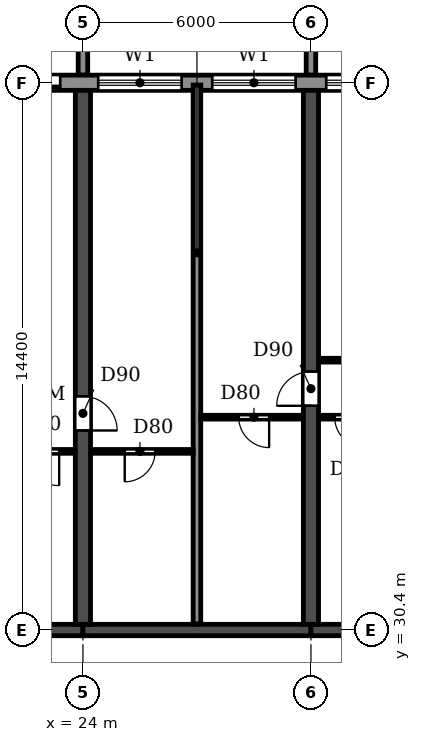
"""IFC4 building model, lengths in metres.
Left out: names, types, materials, properties, quantities, classifications, styles, units other than length and angle.
Written with IfcOpenShell. Run it as: python <this file> out.ifc"""

import sys

from ifc_helpers import new_model, si_unit, direction, frame, frame_2d, origin, place, context, subcontext, project, spatial, polyline, rectangle, outline, extrude, source, transform, mapped, element, fill, save


model = new_model("IFC4")
c1 = context("Model", 3, precision=1e-05, world=origin(), true_north=direction((0.0, 1.0)))
c2 = subcontext(c1, "Body", "Model", "MODEL_VIEW")
j1 = project(units=[si_unit("LENGTHUNIT", "METRE"), si_unit("PLANEANGLEUNIT", "RADIAN")], contexts=[c1])
p1 = place(None, origin())
s1 = spatial("IfcSite", under=j1, at=p1, CompositionType="ELEMENT")
p2 = place(p1, origin())
s2 = spatial("IfcBuilding", under=s1, at=p2, CompositionType="ELEMENT")
p3 = place(p2, frame((0.0, 0.0, 43.2)))
s3 = spatial("IfcBuildingStorey", under=s2, at=p3, CompositionType="ELEMENT", Elevation=43.2)
p4 = place(p3, frame((24.0, 30.55, 0.0), z_axis=(0.0, 0.0, 1.0), x_axis=(0.0, 1.0, 0.0)))
e1 = element("IfcWall", 1, at=p4, inside=s3, PredefinedType="SHEAR", context=c2, shape_type="SweptSolid", body=[
    extrude(rectangle(XDim=14.05, YDim=0.4, at=frame_2d((7.025, 0.0))), origin(), (0.0, 0.0, 1.0), 3.05),
])
p5 = place(p4, frame((5.1, 0.0, 0.0)))
e2 = element("IfcOpeningElement", 2, at=p5, cuts=e1, PredefinedType="OPENING", context=c2, shape_type="SweptSolid", body=[
    extrude(rectangle(XDim=0.9, YDim=2.1, at=frame_2d((0.45, 1.05))), frame((0.0, 0.21, 0.0), z_axis=(0.0, -1.0, 0.0), x_axis=(1.0, 0.0, 0.0)), (0.0, 0.0, 1.0), 0.42),
])
p6 = place(p3, frame((30.0, 30.55, 0.0), z_axis=(0.0, 0.0, 1.0), x_axis=(0.0, 1.0, 0.0)))
e3 = element("IfcWall", 3, at=p6, inside=s3, PredefinedType="SHEAR", context=c2, shape_type="SweptSolid", body=[
    extrude(rectangle(XDim=14.05, YDim=0.4, at=frame_2d((7.025, 0.0))), origin(), (0.0, 0.0, 1.0), 3.05),
])
p7 = place(p6, frame((5.75, 0.0, 0.0)))
e4 = element("IfcOpeningElement", 4, at=p7, cuts=e3, PredefinedType="OPENING", context=c2, shape_type="SweptSolid", body=[
    extrude(rectangle(XDim=0.9, YDim=2.1, at=frame_2d((0.45, 1.05))), frame((0.0, 0.21, 0.0), z_axis=(0.0, -1.0, 0.0), x_axis=(1.0, 0.0, 0.0)), (0.0, 0.0, 1.0), 0.42),
])
p8 = place(p3, frame((18.0, 30.4, 0.0), z_axis=(0.0, 0.0, 1.0), x_axis=(1.0, 0.0, 0.0)))
e5 = element("IfcWall", 5, at=p8, inside=s3, PredefinedType="SHEAR", context=c2, shape_type="SweptSolid", body=[
    extrude(rectangle(XDim=6.0, YDim=0.3, at=frame_2d((3.0, 0.0))), origin(), (0.0, 0.0, 1.0), 2.45),
])
p9 = place(p8, frame((2.45, 0.0, 0.0)))
e6 = element("IfcOpeningElement", 6, at=p9, cuts=e5, PredefinedType="OPENING", context=c2, shape_type="SweptSolid", body=[
    extrude(rectangle(XDim=1.0, YDim=2.1, at=frame_2d((0.5, 1.05))), frame((0.0, 0.16, 0.0), z_axis=(0.0, -1.0, 0.0), x_axis=(1.0, 0.0, 0.0)), (0.0, 0.0, 1.0), 0.32),
])
p10 = place(p3, frame((24.0, 30.4, 0.0), z_axis=(0.0, 0.0, 1.0), x_axis=(1.0, 0.0, 0.0)))
e7 = element("IfcWall", 7, at=p10, inside=s3, PredefinedType="SHEAR", context=c2, shape_type="SweptSolid", body=[
    extrude(rectangle(XDim=6.0, YDim=0.3, at=frame_2d((3.0, 0.0))), origin(), (0.0, 0.0, 1.0), 2.45),
])
p11 = place(p3, frame((30.0, 30.4, 0.0), z_axis=(0.0, 0.0, 1.0), x_axis=(1.0, 0.0, 0.0)))
e8 = element("IfcWall", 8, at=p11, inside=s3, PredefinedType="SHEAR", context=c2, shape_type="SweptSolid", body=[
    extrude(rectangle(XDim=6.0, YDim=0.3, at=frame_2d((3.0, 0.0))), origin(), (0.0, 0.0, 1.0), 2.45),
])
p12 = place(p11, frame((2.45, 0.0, 0.0)))
e9 = element("IfcOpeningElement", 9, at=p12, cuts=e8, PredefinedType="OPENING", context=c2, shape_type="SweptSolid", body=[
    extrude(rectangle(XDim=1.0, YDim=2.1, at=frame_2d((0.5, 1.05))), frame((0.0, 0.16, 0.0), z_axis=(0.0, -1.0, 0.0), x_axis=(1.0, 0.0, 0.0)), (0.0, 0.0, 1.0), 0.32),
])
p13 = place(p3, frame((97.317, 44.8, 0.0), z_axis=(0.0, 0.0, 1.0), x_axis=(-1.0, 0.0, 0.0)))
e10 = element("IfcWall", 10, at=p13, inside=s3, PredefinedType="STANDARD", context=c2, shape_type="SweptSolid", body=[
    extrude(rectangle(XDim=92.634, YDim=0.4, at=frame_2d((46.317, 0.0))), origin(), (0.0, 0.0, 1.0), 3.05),
])
p14 = place(p13, frame((88.917, 0.0, 0.0)))
e11 = element("IfcOpeningElement", 11, at=p14, cuts=e10, PredefinedType="OPENING", context=c2, shape_type="SweptSolid", body=[
    extrude(rectangle(XDim=1.8, YDim=2.4, at=frame_2d((0.9, 1.2))), frame((0.0, 0.21, 0.0), z_axis=(0.0, -1.0, 0.0), x_axis=(1.0, 0.0, 0.0)), (0.0, 0.0, 1.0), 0.42),
])
p15 = place(p13, frame((85.717, 0.0, 0.9)))
e12 = element("IfcOpeningElement", 12, at=p15, cuts=e10, PredefinedType="OPENING", context=c2, shape_type="SweptSolid", body=[
    extrude(rectangle(XDim=2.2, YDim=1.5, at=frame_2d((1.1, 0.75))), frame((0.0, 0.21, 0.0), z_axis=(0.0, -1.0, 0.0), x_axis=(1.0, 0.0, 0.0)), (0.0, 0.0, 1.0), 0.42),
])
p16 = place(p13, frame((82.717, 0.0, 0.9)))
e13 = element("IfcOpeningElement", 13, at=p16, cuts=e10, PredefinedType="OPENING", context=c2, shape_type="SweptSolid", body=[
    extrude(rectangle(XDim=2.2, YDim=1.5, at=frame_2d((1.1, 0.75))), frame((0.0, 0.21, 0.0), z_axis=(0.0, -1.0, 0.0), x_axis=(1.0, 0.0, 0.0)), (0.0, 0.0, 1.0), 0.42),
])
p17 = place(p13, frame((79.717, 0.0, 0.9)))
e14 = element("IfcOpeningElement", 14, at=p17, cuts=e10, PredefinedType="OPENING", context=c2, shape_type="SweptSolid", body=[
    extrude(rectangle(XDim=2.2, YDim=1.5, at=frame_2d((1.1, 0.75))), frame((0.0, 0.21, 0.0), z_axis=(0.0, -1.0, 0.0), x_axis=(1.0, 0.0, 0.0)), (0.0, 0.0, 1.0), 0.42),
])
p18 = place(p13, frame((76.717, 0.0, 0.9)))
e15 = element("IfcOpeningElement", 15, at=p18, cuts=e10, PredefinedType="OPENING", context=c2, shape_type="SweptSolid", body=[
    extrude(rectangle(XDim=2.2, YDim=1.5, at=frame_2d((1.1, 0.75))), frame((0.0, 0.21, 0.0), z_axis=(0.0, -1.0, 0.0), x_axis=(1.0, 0.0, 0.0)), (0.0, 0.0, 1.0), 0.42),
])
p19 = place(p13, frame((73.917, 0.0, 0.0)))
e16 = element("IfcOpeningElement", 16, at=p19, cuts=e10, PredefinedType="OPENING", context=c2, shape_type="SweptSolid", body=[
    extrude(rectangle(XDim=1.8, YDim=2.4, at=frame_2d((0.9, 1.2))), frame((0.0, 0.21, 0.0), z_axis=(0.0, -1.0, 0.0), x_axis=(1.0, 0.0, 0.0)), (0.0, 0.0, 1.0), 0.42),
])
p20 = place(p13, frame((70.717, 0.0, 0.9)))
e17 = element("IfcOpeningElement", 17, at=p20, cuts=e10, PredefinedType="OPENING", context=c2, shape_type="SweptSolid", body=[
    extrude(rectangle(XDim=2.2, YDim=1.5, at=frame_2d((1.1, 0.75))), frame((0.0, 0.21, 0.0), z_axis=(0.0, -1.0, 0.0), x_axis=(1.0, 0.0, 0.0)), (0.0, 0.0, 1.0), 0.42),
])
p21 = place(p13, frame((67.717, 0.0, 0.9)))
e18 = element("IfcOpeningElement", 18, at=p21, cuts=e10, PredefinedType="OPENING", context=c2, shape_type="SweptSolid", body=[
    extrude(rectangle(XDim=2.2, YDim=1.5, at=frame_2d((1.1, 0.75))), frame((0.0, 0.21, 0.0), z_axis=(0.0, -1.0, 0.0), x_axis=(1.0, 0.0, 0.0)), (0.0, 0.0, 1.0), 0.42),
])
p22 = place(p13, frame((64.717, 0.0, 0.9)))
e19 = element("IfcOpeningElement", 19, at=p22, cuts=e10, PredefinedType="OPENING", context=c2, shape_type="SweptSolid", body=[
    extrude(rectangle(XDim=2.2, YDim=1.5, at=frame_2d((1.1, 0.75))), frame((0.0, 0.21, 0.0), z_axis=(0.0, -1.0, 0.0), x_axis=(1.0, 0.0, 0.0)), (0.0, 0.0, 1.0), 0.42),
])
p23 = place(p13, frame((61.917, 0.0, 0.0)))
e20 = element("IfcOpeningElement", 20, at=p23, cuts=e10, PredefinedType="OPENING", context=c2, shape_type="SweptSolid", body=[
    extrude(rectangle(XDim=1.8, YDim=2.4, at=frame_2d((0.9, 1.2))), frame((0.0, 0.21, 0.0), z_axis=(0.0, -1.0, 0.0), x_axis=(1.0, 0.0, 0.0)), (0.0, 0.0, 1.0), 0.42),
])
p24 = place(p13, frame((58.717, 0.0, 0.9)))
e21 = element("IfcOpeningElement", 21, at=p24, cuts=e10, PredefinedType="OPENING", context=c2, shape_type="SweptSolid", body=[
    extrude(rectangle(XDim=2.2, YDim=1.5, at=frame_2d((1.1, 0.75))), frame((0.0, 0.21, 0.0), z_axis=(0.0, -1.0, 0.0), x_axis=(1.0, 0.0, 0.0)), (0.0, 0.0, 1.0), 0.42),
])
p25 = place(p13, frame((55.717, 0.0, 0.9)))
e22 = element("IfcOpeningElement", 22, at=p25, cuts=e10, PredefinedType="OPENING", context=c2, shape_type="SweptSolid", body=[
    extrude(rectangle(XDim=2.2, YDim=1.5, at=frame_2d((1.1, 0.75))), frame((0.0, 0.21, 0.0), z_axis=(0.0, -1.0, 0.0), x_axis=(1.0, 0.0, 0.0)), (0.0, 0.0, 1.0), 0.42),
])
p26 = place(p13, frame((52.717, 0.0, 0.9)))
e23 = element("IfcOpeningElement", 23, at=p26, cuts=e10, PredefinedType="OPENING", context=c2, shape_type="SweptSolid", body=[
    extrude(rectangle(XDim=2.2, YDim=1.5, at=frame_2d((1.1, 0.75))), frame((0.0, 0.21, 0.0), z_axis=(0.0, -1.0, 0.0), x_axis=(1.0, 0.0, 0.0)), (0.0, 0.0, 1.0), 0.42),
])
p27 = place(p13, frame((49.917, 0.0, 0.0)))
e24 = element("IfcOpeningElement", 24, at=p27, cuts=e10, PredefinedType="OPENING", context=c2, shape_type="SweptSolid", body=[
    extrude(rectangle(XDim=1.8, YDim=2.4, at=frame_2d((0.9, 1.2))), frame((0.0, 0.21, 0.0), z_axis=(0.0, -1.0, 0.0), x_axis=(1.0, 0.0, 0.0)), (0.0, 0.0, 1.0), 0.42),
])
p28 = place(p13, frame((46.717, 0.0, 0.9)))
e25 = element("IfcOpeningElement", 25, at=p28, cuts=e10, PredefinedType="OPENING", context=c2, shape_type="SweptSolid", body=[
    extrude(rectangle(XDim=2.2, YDim=1.5, at=frame_2d((1.1, 0.75))), frame((0.0, 0.21, 0.0), z_axis=(0.0, -1.0, 0.0), x_axis=(1.0, 0.0, 0.0)), (0.0, 0.0, 1.0), 0.42),
])
p29 = place(p13, frame((43.717, 0.0, 0.9)))
e26 = element("IfcOpeningElement", 26, at=p29, cuts=e10, PredefinedType="OPENING", context=c2, shape_type="SweptSolid", body=[
    extrude(rectangle(XDim=2.2, YDim=1.5, at=frame_2d((1.1, 0.75))), frame((0.0, 0.21, 0.0), z_axis=(0.0, -1.0, 0.0), x_axis=(1.0, 0.0, 0.0)), (0.0, 0.0, 1.0), 0.42),
])
p30 = place(p13, frame((40.717, 0.0, 0.9)))
e27 = element("IfcOpeningElement", 27, at=p30, cuts=e10, PredefinedType="OPENING", context=c2, shape_type="SweptSolid", body=[
    extrude(rectangle(XDim=2.2, YDim=1.5, at=frame_2d((1.1, 0.75))), frame((0.0, 0.21, 0.0), z_axis=(0.0, -1.0, 0.0), x_axis=(1.0, 0.0, 0.0)), (0.0, 0.0, 1.0), 0.42),
])
p31 = place(p13, frame((37.917, 0.0, 0.0)))
e28 = element("IfcOpeningElement", 28, at=p31, cuts=e10, PredefinedType="OPENING", context=c2, shape_type="SweptSolid", body=[
    extrude(rectangle(XDim=1.8, YDim=2.4, at=frame_2d((0.9, 1.2))), frame((0.0, 0.21, 0.0), z_axis=(0.0, -1.0, 0.0), x_axis=(1.0, 0.0, 0.0)), (0.0, 0.0, 1.0), 0.42),
])
p32 = place(p13, frame((34.717, 0.0, 0.9)))
e29 = element("IfcOpeningElement", 29, at=p32, cuts=e10, PredefinedType="OPENING", context=c2, shape_type="SweptSolid", body=[
    extrude(rectangle(XDim=2.2, YDim=1.5, at=frame_2d((1.1, 0.75))), frame((0.0, 0.21, 0.0), z_axis=(0.0, -1.0, 0.0), x_axis=(1.0, 0.0, 0.0)), (0.0, 0.0, 1.0), 0.42),
])
p33 = place(p13, frame((31.717, 0.0, 0.9)))
e30 = element("IfcOpeningElement", 30, at=p33, cuts=e10, PredefinedType="OPENING", context=c2, shape_type="SweptSolid", body=[
    extrude(rectangle(XDim=2.2, YDim=1.5, at=frame_2d((1.1, 0.75))), frame((0.0, 0.21, 0.0), z_axis=(0.0, -1.0, 0.0), x_axis=(1.0, 0.0, 0.0)), (0.0, 0.0, 1.0), 0.42),
])
p34 = place(p13, frame((28.717, 0.0, 0.9)))
e31 = element("IfcOpeningElement", 31, at=p34, cuts=e10, PredefinedType="OPENING", context=c2, shape_type="SweptSolid", body=[
    extrude(rectangle(XDim=2.2, YDim=1.5, at=frame_2d((1.1, 0.75))), frame((0.0, 0.21, 0.0), z_axis=(0.0, -1.0, 0.0), x_axis=(1.0, 0.0, 0.0)), (0.0, 0.0, 1.0), 0.42),
])
p35 = place(p13, frame((25.917, 0.0, 0.0)))
e32 = element("IfcOpeningElement", 32, at=p35, cuts=e10, PredefinedType="OPENING", context=c2, shape_type="SweptSolid", body=[
    extrude(rectangle(XDim=1.8, YDim=2.4, at=frame_2d((0.9, 1.2))), frame((0.0, 0.21, 0.0), z_axis=(0.0, -1.0, 0.0), x_axis=(1.0, 0.0, 0.0)), (0.0, 0.0, 1.0), 0.42),
])
p36 = place(p13, frame((22.917, 0.0, 0.0)))
e33 = element("IfcOpeningElement", 33, at=p36, cuts=e10, PredefinedType="OPENING", context=c2, shape_type="SweptSolid", body=[
    extrude(rectangle(XDim=1.8, YDim=2.4, at=frame_2d((0.9, 1.2))), frame((0.0, 0.21, 0.0), z_axis=(0.0, -1.0, 0.0), x_axis=(1.0, 0.0, 0.0)), (0.0, 0.0, 1.0), 0.42),
])
p37 = place(p13, frame((19.717, 0.0, 0.9)))
e34 = element("IfcOpeningElement", 34, at=p37, cuts=e10, PredefinedType="OPENING", context=c2, shape_type="SweptSolid", body=[
    extrude(rectangle(XDim=2.2, YDim=1.5, at=frame_2d((1.1, 0.75))), frame((0.0, 0.21, 0.0), z_axis=(0.0, -1.0, 0.0), x_axis=(1.0, 0.0, 0.0)), (0.0, 0.0, 1.0), 0.42),
])
p38 = place(p13, frame((16.717, 0.0, 0.9)))
e35 = element("IfcOpeningElement", 35, at=p38, cuts=e10, PredefinedType="OPENING", context=c2, shape_type="SweptSolid", body=[
    extrude(rectangle(XDim=2.2, YDim=1.5, at=frame_2d((1.1, 0.75))), frame((0.0, 0.21, 0.0), z_axis=(0.0, -1.0, 0.0), x_axis=(1.0, 0.0, 0.0)), (0.0, 0.0, 1.0), 0.42),
])
p39 = place(p13, frame((13.717, 0.0, 0.9)))
e36 = element("IfcOpeningElement", 36, at=p39, cuts=e10, PredefinedType="OPENING", context=c2, shape_type="SweptSolid", body=[
    extrude(rectangle(XDim=2.2, YDim=1.5, at=frame_2d((1.1, 0.75))), frame((0.0, 0.21, 0.0), z_axis=(0.0, -1.0, 0.0), x_axis=(1.0, 0.0, 0.0)), (0.0, 0.0, 1.0), 0.42),
])
p40 = place(p13, frame((10.717, 0.0, 0.9)))
e37 = element("IfcOpeningElement", 37, at=p40, cuts=e10, PredefinedType="OPENING", context=c2, shape_type="SweptSolid", body=[
    extrude(rectangle(XDim=2.2, YDim=1.5, at=frame_2d((1.1, 0.75))), frame((0.0, 0.21, 0.0), z_axis=(0.0, -1.0, 0.0), x_axis=(1.0, 0.0, 0.0)), (0.0, 0.0, 1.0), 0.42),
])
p41 = place(p13, frame((7.917, 0.0, 0.0)))
e38 = element("IfcOpeningElement", 38, at=p41, cuts=e10, PredefinedType="OPENING", context=c2, shape_type="SweptSolid", body=[
    extrude(rectangle(XDim=1.8, YDim=2.4, at=frame_2d((0.9, 1.2))), frame((0.0, 0.21, 0.0), z_axis=(0.0, -1.0, 0.0), x_axis=(1.0, 0.0, 0.0)), (0.0, 0.0, 1.0), 0.42),
])
p42 = place(p13, frame((4.717, 0.0, 0.9)))
e39 = element("IfcOpeningElement", 39, at=p42, cuts=e10, PredefinedType="OPENING", context=c2, shape_type="SweptSolid", body=[
    extrude(rectangle(XDim=2.2, YDim=1.5, at=frame_2d((1.1, 0.75))), frame((0.0, 0.21, 0.0), z_axis=(0.0, -1.0, 0.0), x_axis=(1.0, 0.0, 0.0)), (0.0, 0.0, 1.0), 0.42),
])
p43 = place(p13, frame((1.917, 0.0, 0.0)))
e40 = element("IfcOpeningElement", 40, at=p43, cuts=e10, PredefinedType="OPENING", context=c2, shape_type="SweptSolid", body=[
    extrude(rectangle(XDim=1.8, YDim=2.4, at=frame_2d((0.9, 1.2))), frame((0.0, 0.21, 0.0), z_axis=(0.0, -1.0, 0.0), x_axis=(1.0, 0.0, 0.0)), (0.0, 0.0, 1.0), 0.42),
])
m1 = source(origin(), c2, "Body", "SweptSolid", [
    extrude(outline(polyline([(0.0, 0.0), (0.25, 0.0), (0.25, 3.1), (0.0, 3.1), (0.0, 0.0)])), origin(), (0.0, 0.0, 1.0), 3.1),
])
for number, where in (
    (41, (23.875, 45.0, 0.0)),
    (42, (29.875, 45.0, 0.0)),
):
    element("IfcWall", number, at=place(p3, frame(where)), inside=s3, PredefinedType="STANDARD", context=c2, shape_type="MappedRepresentation", body=[
        mapped(m1, transform((0.0, 0.0, 0.0))),
    ])
p44 = place(p3, frame((27.0, 30.56, 0.0), z_axis=(0.0, 0.0, 1.0), x_axis=(0.0, 1.0, 0.0)))
e43 = element("IfcWall", 43, at=p44, inside=s3, PredefinedType="PARTITIONING", context=c2, shape_type="SweptSolid", body=[
    extrude(rectangle(XDim=14.18, YDim=0.2, at=frame_2d((7.09, 0.0))), origin(), (0.0, 0.0, 1.0), 3.05),
])
p45 = place(p3, frame((21.8, 35.1, 0.0), z_axis=(0.0, 0.0, 1.0), x_axis=(1.0, 0.0, 0.0)))
e44 = element("IfcWall", 44, at=p45, inside=s3, PredefinedType="PARTITIONING", context=c2, shape_type="SweptSolid", body=[
    extrude(rectangle(XDim=1.99, YDim=0.1, at=frame_2d((0.995, 0.0))), origin(), (0.0, 0.0, 1.0), 3.05),
])
p46 = place(p45, frame((0.675, 0.0, 0.0)))
e45 = element("IfcOpeningElement", 45, at=p46, cuts=e44, PredefinedType="OPENING", context=c2, shape_type="SweptSolid", body=[
    extrude(rectangle(XDim=0.9, YDim=2.1, at=frame_2d((0.45, 1.05))), frame((0.0, 0.06, 0.0), z_axis=(0.0, -1.0, 0.0), x_axis=(1.0, 0.0, 0.0)), (0.0, 0.0, 1.0), 0.12),
])
p47 = place(p3, frame((24.21, 35.1, 0.0), z_axis=(0.0, 0.0, 1.0), x_axis=(1.0, 0.0, 0.0)))
e46 = element("IfcWall", 46, at=p47, inside=s3, PredefinedType="PARTITIONING", context=c2, shape_type="SweptSolid", body=[
    extrude(rectangle(XDim=2.69, YDim=0.1, at=frame_2d((1.345, 0.0))), origin(), (0.0, 0.0, 1.0), 3.05),
])
p48 = place(p47, frame((0.89, 0.0, 0.0)))
e47 = element("IfcOpeningElement", 47, at=p48, cuts=e46, PredefinedType="OPENING", context=c2, shape_type="SweptSolid", body=[
    extrude(rectangle(XDim=0.8, YDim=2.1, at=frame_2d((0.4, 1.05))), frame((0.0, 0.06, 0.0), z_axis=(0.0, -1.0, 0.0), x_axis=(1.0, 0.0, 0.0)), (0.0, 0.0, 1.0), 0.12),
])
p49 = place(p3, frame((27.1, 36.0, 0.0), z_axis=(0.0, 0.0, 1.0), x_axis=(1.0, 0.0, 0.0)))
e48 = element("IfcWall", 48, at=p49, inside=s3, PredefinedType="PARTITIONING", context=c2, shape_type="SweptSolid", body=[
    extrude(rectangle(XDim=2.69, YDim=0.1, at=frame_2d((1.345, 0.0))), origin(), (0.0, 0.0, 1.0), 3.05),
])
p50 = place(p49, frame((1.0, 0.0, 0.0)))
e49 = element("IfcOpeningElement", 49, at=p50, cuts=e48, PredefinedType="OPENING", context=c2, shape_type="SweptSolid", body=[
    extrude(rectangle(XDim=0.8, YDim=2.1, at=frame_2d((0.4, 1.05))), frame((0.0, 0.06, 0.0), z_axis=(0.0, -1.0, 0.0), x_axis=(1.0, 0.0, 0.0)), (0.0, 0.0, 1.0), 0.12),
])
p51 = place(p3, frame((30.21, 36.0, 0.0), z_axis=(0.0, 0.0, 1.0), x_axis=(1.0, 0.0, 0.0)))
e50 = element("IfcWall", 50, at=p51, inside=s3, PredefinedType="PARTITIONING", context=c2, shape_type="SweptSolid", body=[
    extrude(rectangle(XDim=1.89, YDim=0.1, at=frame_2d((0.945, 0.0))), origin(), (0.0, 0.0, 1.0), 3.05),
])
p52 = place(p51, frame((0.415, 0.0, 0.0)))
e51 = element("IfcOpeningElement", 51, at=p52, cuts=e50, PredefinedType="OPENING", context=c2, shape_type="SweptSolid", body=[
    extrude(rectangle(XDim=0.8, YDim=2.1, at=frame_2d((0.4, 1.05))), frame((0.0, 0.06, 0.0), z_axis=(0.0, -1.0, 0.0), x_axis=(1.0, 0.0, 0.0)), (0.0, 0.0, 1.0), 0.12),
])
p53 = place(p3, frame((30.21, 37.5, 0.0), z_axis=(0.0, 0.0, 1.0), x_axis=(1.0, 0.0, 0.0)))
e52 = element("IfcWall", 52, at=p53, inside=s3, PredefinedType="PARTITIONING", context=c2, shape_type="SweptSolid", body=[
    extrude(rectangle(XDim=2.84, YDim=0.1, at=frame_2d((1.42, 0.0))), origin(), (0.0, 0.0, 1.0), 3.05),
])
p54 = place(p53, frame((1.39, 0.0, 0.0)))
e53 = element("IfcOpeningElement", 53, at=p54, cuts=e52, PredefinedType="OPENING", context=c2, shape_type="SweptSolid", body=[
    extrude(rectangle(XDim=0.9, YDim=2.1, at=frame_2d((0.45, 1.05))), frame((0.0, 0.06, 0.0), z_axis=(0.0, -1.0, 0.0), x_axis=(1.0, 0.0, 0.0)), (0.0, 0.0, 1.0), 0.12),
])
p55 = place(p19, origin())
e54 = element("IfcDoor", 54, at=p55, inside=s3, OperationType="DOUBLE_DOOR_SLIDING", PredefinedType="DOOR", context=c2, shape_type="SweptSolid", body=[
    extrude(rectangle(XDim=1.8, YDim=2.4, at=frame_2d((0.9, 1.2))), frame((0.0, 0.025, 0.0), z_axis=(0.0, -1.0, 0.0), x_axis=(1.0, 0.0, 0.0)), (0.0, 0.0, 1.0), 0.05),
])
fill(e16, e54)
p56 = place(p20, origin())
e55 = element("IfcWindow", 55, at=p56, inside=s3, PartitioningType="DOUBLE_PANEL_HORIZONTAL", PredefinedType="WINDOW", context=c2, shape_type="SweptSolid", body=[
    extrude(rectangle(XDim=2.2, YDim=1.5, at=frame_2d((1.1, 0.75))), frame((0.0, 0.03, 0.0), z_axis=(0.0, -1.0, 0.0), x_axis=(1.0, 0.0, 0.0)), (0.0, 0.0, 1.0), 0.06),
])
fill(e17, e55)
p57 = place(p21, origin())
e56 = element("IfcWindow", 56, at=p57, inside=s3, PartitioningType="DOUBLE_PANEL_HORIZONTAL", PredefinedType="WINDOW", context=c2, shape_type="SweptSolid", body=[
    extrude(rectangle(XDim=2.2, YDim=1.5, at=frame_2d((1.1, 0.75))), frame((0.0, 0.03, 0.0), z_axis=(0.0, -1.0, 0.0), x_axis=(1.0, 0.0, 0.0)), (0.0, 0.0, 1.0), 0.06),
])
fill(e18, e56)
p58 = place(p22, origin())
e57 = element("IfcWindow", 57, at=p58, inside=s3, PartitioningType="DOUBLE_PANEL_HORIZONTAL", PredefinedType="WINDOW", context=c2, shape_type="SweptSolid", body=[
    extrude(rectangle(XDim=2.2, YDim=1.5, at=frame_2d((1.1, 0.75))), frame((0.0, 0.03, 0.0), z_axis=(0.0, -1.0, 0.0), x_axis=(1.0, 0.0, 0.0)), (0.0, 0.0, 1.0), 0.06),
])
fill(e19, e57)
p59 = place(p48, frame((0.8, 0.0, 0.0), z_axis=(0.0, 0.0, 1.0), x_axis=(-1.0, 0.0, 0.0)))
e58 = element("IfcDoor", 58, at=p59, inside=s3, OperationType="SINGLE_SWING_RIGHT", PredefinedType="DOOR", context=c2, shape_type="SweptSolid", body=[
    extrude(rectangle(XDim=0.8, YDim=2.1, at=frame_2d((0.4, 1.05))), frame((0.0, 0.025, 0.0), z_axis=(0.0, -1.0, 0.0), x_axis=(1.0, 0.0, 0.0)), (0.0, 0.0, 1.0), 0.05),
])
fill(e47, e58)
p60 = place(p46, frame((0.9, 0.0, 0.0), z_axis=(0.0, 0.0, 1.0), x_axis=(-1.0, 0.0, 0.0)))
e59 = element("IfcDoor", 59, at=p60, inside=s3, OperationType="SINGLE_SWING_LEFT", PredefinedType="DOOR", context=c2, shape_type="SweptSolid", body=[
    extrude(rectangle(XDim=0.9, YDim=2.1, at=frame_2d((0.45, 1.05))), frame((0.0, 0.025, 0.0), z_axis=(0.0, -1.0, 0.0), x_axis=(1.0, 0.0, 0.0)), (0.0, 0.0, 1.0), 0.05),
])
fill(e45, e59)
p61 = place(p5, frame((0.9, 0.0, 0.0), z_axis=(0.0, 0.0, 1.0), x_axis=(-1.0, 0.0, 0.0)))
e60 = element("IfcDoor", 60, at=p61, inside=s3, OperationType="SINGLE_SWING_RIGHT", PredefinedType="DOOR", context=c2, shape_type="SweptSolid", body=[
    extrude(rectangle(XDim=0.9, YDim=2.1, at=frame_2d((0.45, 1.05))), frame((0.0, 0.025, 0.0), z_axis=(0.0, -1.0, 0.0), x_axis=(1.0, 0.0, 0.0)), (0.0, 0.0, 1.0), 0.05),
])
fill(e2, e60)
p62 = place(p50, frame((0.8, 0.0, 0.0), z_axis=(0.0, 0.0, 1.0), x_axis=(-1.0, 0.0, 0.0)))
e61 = element("IfcDoor", 61, at=p62, inside=s3, OperationType="SINGLE_SWING_LEFT", PredefinedType="DOOR", context=c2, shape_type="SweptSolid", body=[
    extrude(rectangle(XDim=0.8, YDim=2.1, at=frame_2d((0.4, 1.05))), frame((0.0, 0.025, 0.0), z_axis=(0.0, -1.0, 0.0), x_axis=(1.0, 0.0, 0.0)), (0.0, 0.0, 1.0), 0.05),
])
fill(e49, e61)
p63 = place(p7, origin())
e62 = element("IfcDoor", 62, at=p63, inside=s3, OperationType="SINGLE_SWING_LEFT", PredefinedType="DOOR", context=c2, shape_type="SweptSolid", body=[
    extrude(rectangle(XDim=0.9, YDim=2.1, at=frame_2d((0.45, 1.05))), frame((0.0, 0.025, 0.0), z_axis=(0.0, -1.0, 0.0), x_axis=(1.0, 0.0, 0.0)), (0.0, 0.0, 1.0), 0.05),
])
fill(e4, e62)
p64 = place(p52, frame((0.8, 0.0, 0.0), z_axis=(0.0, 0.0, 1.0), x_axis=(-1.0, 0.0, 0.0)))
e63 = element("IfcDoor", 63, at=p64, inside=s3, OperationType="SINGLE_SWING_LEFT", PredefinedType="DOOR", context=c2, shape_type="SweptSolid", body=[
    extrude(rectangle(XDim=0.8, YDim=2.1, at=frame_2d((0.4, 1.05))), frame((0.0, 0.025, 0.0), z_axis=(0.0, -1.0, 0.0), x_axis=(1.0, 0.0, 0.0)), (0.0, 0.0, 1.0), 0.05),
])
fill(e51, e63)
save(model, sys.argv[1])
